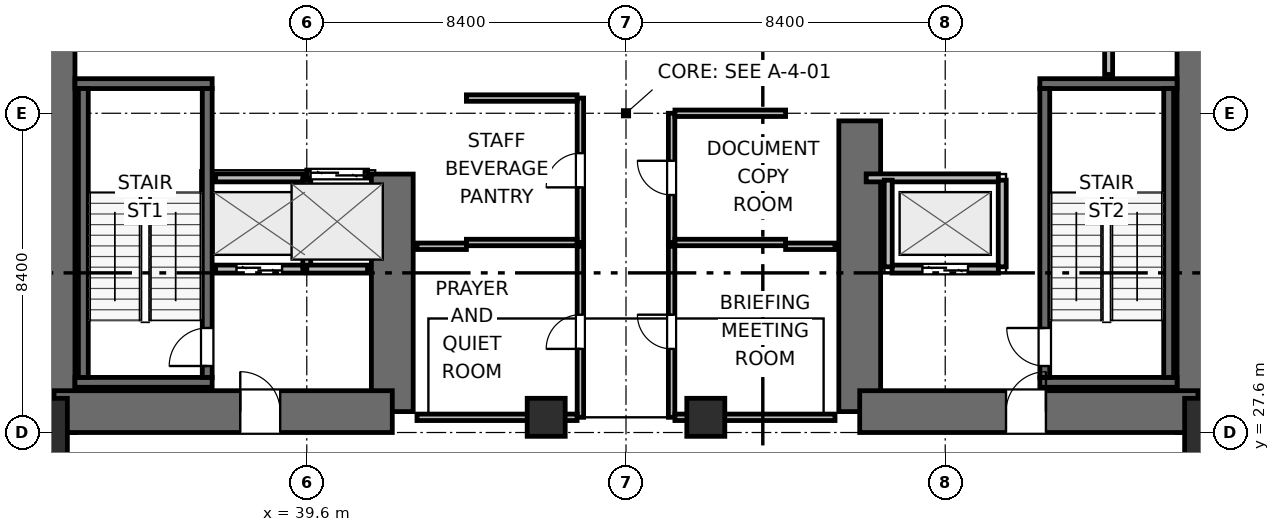
"""IFC4 building model, lengths in metres.
Left out: names, types, materials, properties, quantities, classifications, styles, units other than length and angle.
Written with IfcOpenShell. Run it as: python <this file> out.ifc"""

import sys

from ifc_helpers import new_model, si_unit, direction, frame, frame_2d, origin, origin_2d, place, context, subcontext, project, spatial, rectangle, extrude, element, fill, save


model = new_model("IFC4")
c1 = context("Model", 3, precision=1e-05, world=origin(), true_north=direction((0.0, 1.0)))
c2 = subcontext(c1, "Body", "Model", "MODEL_VIEW")
j1 = project(units=[si_unit("LENGTHUNIT", "METRE"), si_unit("PLANEANGLEUNIT", "RADIAN")], contexts=[c1])
p1 = place(None, origin())
s1 = spatial("IfcSite", under=j1, at=p1, CompositionType="ELEMENT")
p2 = place(p1, origin())
s2 = spatial("IfcBuilding", under=s1, at=p2, CompositionType="ELEMENT")
p3 = place(p2, frame((0.0, 0.0, -9.0)))
s3 = spatial("IfcBuildingStorey", under=s2, at=p3, CompositionType="ELEMENT", Elevation=-9.0)
p4 = place(p3, frame((32.95, 27.6, 0.0), z_axis=(0.0, 0.0, 1.0), x_axis=(0.0, 1.0, 0.0)))
e1 = element("IfcWall", 1, at=p4, inside=s3, PredefinedType="SHEAR", context=c2, shape_type="SweptSolid", body=[
    extrude(rectangle(XDim=16.8, YDim=1.1, at=frame_2d((8.4, 0.0))), origin(), (0.0, 0.0, 1.0), 4.5),
])
p5 = place(p3, frame((41.85, 28.15, 0.0), z_axis=(0.0, 0.0, 1.0), x_axis=(0.0, 1.0, 0.0)))
e2 = element("IfcWall", 2, at=p5, inside=s3, PredefinedType="SHEAR", context=c2, shape_type="SweptSolid", body=[
    extrude(rectangle(XDim=6.25, YDim=1.1, at=frame_2d((3.125, 0.0))), origin(), (0.0, 0.0, 1.0), 4.5),
])
p6 = place(p3, frame((32.95, 28.15, 0.0), z_axis=(0.0, 0.0, 1.0), x_axis=(1.0, 0.0, 0.0)))
e3 = element("IfcWall", 3, at=p6, inside=s3, PredefinedType="SHEAR", context=c2, shape_type="SweptSolid", body=[
    extrude(rectangle(XDim=8.9, YDim=1.1, at=frame_2d((4.45, 0.0))), origin(), (0.0, 0.0, 1.0), 4.5),
])
p7 = place(p6, frame((4.9, 0.0, 0.0)))
e4 = element("IfcOpeningElement", 4, at=p7, cuts=e3, PredefinedType="OPENING", context=c2, shape_type="SweptSolid", body=[
    extrude(rectangle(XDim=1.05, YDim=2.04, at=frame_2d((0.525, 1.02))), frame((0.0, 0.56, 0.0), z_axis=(0.0, -1.0, 0.0), x_axis=(1.0, 0.0, 0.0)), (0.0, 0.0, 1.0), 1.12),
])
p8 = place(p3, frame((54.15, 28.15, 0.0), z_axis=(0.0, 0.0, 1.0), x_axis=(0.0, 1.0, 0.0)))
e5 = element("IfcWall", 5, at=p8, inside=s3, PredefinedType="SHEAR", context=c2, shape_type="SweptSolid", body=[
    extrude(rectangle(XDim=7.65, YDim=1.1, at=frame_2d((3.825, 0.0))), origin(), (0.0, 0.0, 1.0), 4.5),
])
p9 = place(p3, frame((63.05, 27.6, 0.0), z_axis=(0.0, 0.0, 1.0), x_axis=(0.0, 1.0, 0.0)))
e6 = element("IfcWall", 6, at=p9, inside=s3, PredefinedType="SHEAR", context=c2, shape_type="SweptSolid", body=[
    extrude(rectangle(XDim=16.8, YDim=1.1, at=frame_2d((8.4, 0.0))), origin(), (0.0, 0.0, 1.0), 4.5),
])
p10 = place(p3, frame((54.15, 28.15, 0.0), z_axis=(0.0, 0.0, 1.0), x_axis=(1.0, 0.0, 0.0)))
e7 = element("IfcWall", 7, at=p10, inside=s3, PredefinedType="SHEAR", context=c2, shape_type="SweptSolid", body=[
    extrude(rectangle(XDim=8.9, YDim=1.1, at=frame_2d((4.45, 0.0))), origin(), (0.0, 0.0, 1.0), 4.5),
])
p11 = place(p10, frame((3.85, 0.0, 0.0)))
e8 = element("IfcOpeningElement", 8, at=p11, cuts=e7, PredefinedType="OPENING", context=c2, shape_type="SweptSolid", body=[
    extrude(rectangle(XDim=1.05, YDim=2.04, at=frame_2d((0.525, 1.02))), frame((0.0, 0.56, 0.0), z_axis=(0.0, -1.0, 0.0), x_axis=(1.0, 0.0, 0.0)), (0.0, 0.0, 1.0), 1.12),
])
for number, where, z_axis, x_axis in (
    (9, (33.5, 28.92, 0.0), (0.0, 0.0, 1.0), (1.0, 0.0, 0.0)),
    (10, (33.5, 36.78, 0.0), (0.0, 0.0, 1.0), (1.0, 0.0, 0.0)),
):
    element("IfcWall", number, at=place(p3, frame(where, z_axis=z_axis, x_axis=x_axis)), inside=s3, PredefinedType="SHEAR", context=c2, shape_type="SweptSolid", body=[
        extrude(rectangle(XDim=3.61, YDim=0.26, at=frame_2d((1.805, 0.0))), origin(), (0.0, 0.0, 1.0), 4.5),
    ])
p12 = place(p3, frame((33.72, 29.05, 0.0), z_axis=(0.0, 0.0, 1.0), x_axis=(0.0, 1.0, 0.0)))
e11 = element("IfcWall", 11, at=p12, inside=s3, PredefinedType="SHEAR", context=c2, shape_type="SweptSolid", body=[
    extrude(rectangle(XDim=7.6, YDim=0.26, at=frame_2d((3.8, 0.0))), origin(), (0.0, 0.0, 1.0), 4.5),
])
p13 = place(p3, frame((36.98, 29.05, 0.0), z_axis=(0.0, 0.0, 1.0), x_axis=(0.0, 1.0, 0.0)))
e12 = element("IfcWall", 12, at=p13, inside=s3, PredefinedType="SHEAR", context=c2, shape_type="SweptSolid", body=[
    extrude(rectangle(XDim=7.6, YDim=0.26, at=frame_2d((3.8, 0.0))), origin(), (0.0, 0.0, 1.0), 4.5),
])
p14 = place(p13, frame((0.3, 0.0, 0.0)))
e13 = element("IfcOpeningElement", 13, at=p14, cuts=e12, PredefinedType="OPENING", context=c2, shape_type="SweptSolid", body=[
    extrude(rectangle(XDim=1.0, YDim=2.04, at=frame_2d((0.5, 1.02))), frame((0.0, 0.14, 0.0), z_axis=(0.0, -1.0, 0.0), x_axis=(1.0, 0.0, 0.0)), (0.0, 0.0, 1.0), 0.28),
])
for number, where, z_axis, x_axis in (
    (14, (58.89, 28.92, 0.0), (0.0, 0.0, 1.0), (1.0, 0.0, 0.0)),
    (15, (58.89, 36.78, 0.0), (0.0, 0.0, 1.0), (1.0, 0.0, 0.0)),
):
    element("IfcWall", number, at=place(p3, frame(where, z_axis=z_axis, x_axis=x_axis)), inside=s3, PredefinedType="SHEAR", context=c2, shape_type="SweptSolid", body=[
        extrude(rectangle(XDim=3.61, YDim=0.26, at=frame_2d((1.805, 0.0))), origin(), (0.0, 0.0, 1.0), 4.5),
    ])
p15 = place(p3, frame((59.02, 29.05, 0.0), z_axis=(0.0, 0.0, 1.0), x_axis=(0.0, 1.0, 0.0)))
e16 = element("IfcWall", 16, at=p15, inside=s3, PredefinedType="SHEAR", context=c2, shape_type="SweptSolid", body=[
    extrude(rectangle(XDim=7.6, YDim=0.26, at=frame_2d((3.8, 0.0))), origin(), (0.0, 0.0, 1.0), 4.5),
])
p16 = place(p15, frame((0.3, 0.0, 0.0)))
e17 = element("IfcOpeningElement", 17, at=p16, cuts=e16, PredefinedType="OPENING", context=c2, shape_type="SweptSolid", body=[
    extrude(rectangle(XDim=1.0, YDim=2.04, at=frame_2d((0.5, 1.02))), frame((0.0, 0.14, 0.0), z_axis=(0.0, -1.0, 0.0), x_axis=(1.0, 0.0, 0.0)), (0.0, 0.0, 1.0), 0.28),
])
p17 = place(p3, frame((62.28, 29.05, 0.0), z_axis=(0.0, 0.0, 1.0), x_axis=(0.0, 1.0, 0.0)))
e18 = element("IfcWall", 18, at=p17, inside=s3, PredefinedType="SHEAR", context=c2, shape_type="SweptSolid", body=[
    extrude(rectangle(XDim=7.6, YDim=0.26, at=frame_2d((3.8, 0.0))), origin(), (0.0, 0.0, 1.0), 4.5),
])
for number, where, z_axis, x_axis in (
    (19, (32.4, 27.6, 0.0), (0.0, 0.0, 1.0), (1.0, 0.0, 0.0)),
    (20, (63.6, 27.6, 0.0), (0.0, 0.0, 1.0), (1.0, 0.0, 0.0)),
):
    element("IfcColumn", number, at=place(p3, frame(where, z_axis=z_axis, x_axis=x_axis)), inside=s3, PredefinedType="COLUMN", context=c2, shape_type="SweptSolid", body=[
        extrude(rectangle(XDim=1.8, YDim=1.8, at=origin_2d()), origin(), (0.0, 0.0, 1.0), 4.5),
    ])
for number, where, z_axis, x_axis in (
    (21, (45.9, 28.0, 0.0), (0.0, 0.0, 1.0), (1.0, 0.0, 0.0)),
    (22, (50.1, 28.0, 0.0), (0.0, 0.0, 1.0), (1.0, 0.0, 0.0)),
):
    element("IfcColumn", number, at=place(p3, frame(where, z_axis=z_axis, x_axis=x_axis)), inside=s3, PredefinedType="COLUMN", context=c2, shape_type="SweptSolid", body=[
        extrude(rectangle(XDim=1.0, YDim=1.0, at=origin_2d()), origin(), (0.0, 0.0, 1.0), 4.5),
    ])
p18 = place(p3, frame((60.7, 37.02, 0.0), z_axis=(0.0, 0.0, 1.0), x_axis=(0.0, 1.0, 0.0)))
e23 = element("IfcWall", 23, at=p18, inside=s3, PredefinedType="PARTITIONING", context=c2, shape_type="SweptSolid", body=[
    extrude(rectangle(XDim=1.96, YDim=0.21, at=frame_2d((0.98, 0.0))), origin(), (0.0, 0.0, 1.0), 4.18),
])
p19 = place(p3, frame((37.2, 31.9, 0.0), z_axis=(0.0, 0.0, 1.0), x_axis=(1.0, 0.0, 0.0)))
e24 = element("IfcWall", 24, at=p19, inside=s3, PredefinedType="PARTITIONING", context=c2, shape_type="SweptSolid", body=[
    extrude(rectangle(XDim=2.3, YDim=0.21, at=frame_2d((1.15, 0.0))), origin(), (0.0, 0.0, 1.0), 4.18),
])
p20 = place(p19, frame((0.55, 0.0, 0.0)))
e25 = element("IfcOpeningElement", 25, at=p20, cuts=e24, PredefinedType="OPENING", context=c2, shape_type="SweptSolid", body=[
    extrude(rectangle(XDim=1.2, YDim=2.04, at=frame_2d((0.6, 1.02))), frame((0.0, 0.115, 0.0), z_axis=(0.0, -1.0, 0.0), x_axis=(1.0, 0.0, 0.0)), (0.0, 0.0, 1.0), 0.23),
])
p21 = place(p3, frame((37.2, 34.3, 0.0), z_axis=(0.0, 0.0, 1.0), x_axis=(1.0, 0.0, 0.0)))
e26 = element("IfcWall", 26, at=p21, inside=s3, PredefinedType="PARTITIONING", context=c2, shape_type="SweptSolid", body=[
    extrude(rectangle(XDim=2.3, YDim=0.21, at=frame_2d((1.15, 0.0))), origin(), (0.0, 0.0, 1.0), 4.18),
])
p22 = place(p3, frame((39.6, 31.96, 0.0), z_axis=(0.0, 0.0, 1.0), x_axis=(0.0, 1.0, 0.0)))
e27 = element("IfcWall", 27, at=p22, inside=s3, PredefinedType="PARTITIONING", context=c2, shape_type="SweptSolid", body=[
    extrude(rectangle(XDim=2.28, YDim=0.21, at=frame_2d((1.14, 0.0))), origin(), (0.0, 0.0, 1.0), 4.18),
])
p23 = place(p3, frame((55.0, 31.9, 0.0), z_axis=(0.0, 0.0, 1.0), x_axis=(1.0, 0.0, 0.0)))
e28 = element("IfcWall", 28, at=p23, inside=s3, PredefinedType="PARTITIONING", context=c2, shape_type="SweptSolid", body=[
    extrude(rectangle(XDim=2.8, YDim=0.21, at=frame_2d((1.4, 0.0))), origin(), (0.0, 0.0, 1.0), 4.18),
])
p24 = place(p23, frame((0.8, 0.0, 0.0)))
e29 = element("IfcOpeningElement", 29, at=p24, cuts=e28, PredefinedType="OPENING", context=c2, shape_type="SweptSolid", body=[
    extrude(rectangle(XDim=1.2, YDim=2.04, at=frame_2d((0.6, 1.02))), frame((0.0, 0.115, 0.0), z_axis=(0.0, -1.0, 0.0), x_axis=(1.0, 0.0, 0.0)), (0.0, 0.0, 1.0), 0.23),
])
p25 = place(p3, frame((54.32, 34.3, 0.0), z_axis=(0.0, 0.0, 1.0), x_axis=(1.0, 0.0, 0.0)))
e30 = element("IfcWall", 30, at=p25, inside=s3, PredefinedType="PARTITIONING", context=c2, shape_type="SweptSolid", body=[
    extrude(rectangle(XDim=3.48, YDim=0.21, at=frame_2d((1.74, 0.0))), origin(), (0.0, 0.0, 1.0), 4.18),
])
for number, where, z_axis, x_axis in (
    (31, (54.9, 31.96, 0.0), (0.0, 0.0, 1.0), (0.0, 1.0, 0.0)),
    (32, (57.9, 31.96, 0.0), (0.0, 0.0, 1.0), (0.0, 1.0, 0.0)),
):
    element("IfcWall", number, at=place(p3, frame(where, z_axis=z_axis, x_axis=x_axis)), inside=s3, PredefinedType="PARTITIONING", context=c2, shape_type="SweptSolid", body=[
        extrude(rectangle(XDim=2.28, YDim=0.21, at=frame_2d((1.14, 0.0))), origin(), (0.0, 0.0, 1.0), 4.18),
    ])
p26 = place(p3, frame((39.6, 34.4, 0.0), z_axis=(0.0, 0.0, 1.0), x_axis=(1.0, 0.0, 0.0)))
e33 = element("IfcWall", 33, at=p26, inside=s3, PredefinedType="PARTITIONING", context=c2, shape_type="SweptSolid", body=[
    extrude(rectangle(XDim=1.6, YDim=0.21, at=frame_2d((0.8, 0.0))), origin(), (0.0, 0.0, 1.0), 4.18),
])
p27 = place(p26, frame((0.1, 0.0, 0.0)))
e34 = element("IfcOpeningElement", 34, at=p27, cuts=e33, PredefinedType="OPENING", context=c2, shape_type="SweptSolid", body=[
    extrude(rectangle(XDim=1.4, YDim=2.06, at=frame_2d((0.7, 1.03))), frame((0.0, 0.115, 0.0), z_axis=(0.0, -1.0, 0.0), x_axis=(1.0, 0.0, 0.0)), (0.0, 0.0, 1.0), 0.23),
])
p28 = place(p3, frame((39.6, 31.9, 0.0), z_axis=(0.0, 0.0, 1.0), x_axis=(1.0, 0.0, 0.0)))
e35 = element("IfcWall", 35, at=p28, inside=s3, PredefinedType="PARTITIONING", context=c2, shape_type="SweptSolid", body=[
    extrude(rectangle(XDim=1.6, YDim=0.21, at=frame_2d((0.8, 0.0))), origin(), (0.0, 0.0, 1.0), 4.18),
])
p29 = place(p3, frame((46.8, 32.6, 0.0), z_axis=(0.0, 0.0, 1.0), x_axis=(0.0, 1.0, 0.0)))
e36 = element("IfcWall", 36, at=p29, inside=s3, PredefinedType="PARTITIONING", context=c2, shape_type="SweptSolid", body=[
    extrude(rectangle(XDim=3.8, YDim=0.17, at=frame_2d((1.9, 0.0))), origin(), (0.0, 0.0, 1.0), 4.18),
])
p30 = place(p29, frame((1.45, 0.0, 0.0)))
e37 = element("IfcOpeningElement", 37, at=p30, cuts=e36, PredefinedType="OPENING", context=c2, shape_type="SweptSolid", body=[
    extrude(rectangle(XDim=0.9, YDim=2.02, at=frame_2d((0.45, 1.01))), frame((0.0, 0.095, 0.0), z_axis=(0.0, -1.0, 0.0), x_axis=(1.0, 0.0, 0.0)), (0.0, 0.0, 1.0), 0.19),
])
for number, where, z_axis, x_axis in (
    (38, (43.8, 32.6, 0.0), (0.0, 0.0, 1.0), (1.0, 0.0, 0.0)),
    (39, (43.8, 36.4, 0.0), (0.0, 0.0, 1.0), (1.0, 0.0, 0.0)),
):
    element("IfcWall", number, at=place(p3, frame(where, z_axis=z_axis, x_axis=x_axis)), inside=s3, PredefinedType="PARTITIONING", context=c2, shape_type="SweptSolid", body=[
        extrude(rectangle(XDim=2.913, YDim=0.17, at=frame_2d((1.457, 0.0))), origin(), (0.0, 0.0, 1.0), 4.18),
    ])
p31 = place(p3, frame((49.2, 32.6, 0.0), z_axis=(0.0, 0.0, 1.0), x_axis=(0.0, 1.0, 0.0)))
e40 = element("IfcWall", 40, at=p31, inside=s3, PredefinedType="PARTITIONING", context=c2, shape_type="SweptSolid", body=[
    extrude(rectangle(XDim=3.4, YDim=0.17, at=frame_2d((1.7, 0.0))), origin(), (0.0, 0.0, 1.0), 4.18),
])
p32 = place(p31, frame((1.25, 0.0, 0.0)))
e41 = element("IfcOpeningElement", 41, at=p32, cuts=e40, PredefinedType="OPENING", context=c2, shape_type="SweptSolid", body=[
    extrude(rectangle(XDim=0.9, YDim=2.02, at=frame_2d((0.45, 1.01))), frame((0.0, 0.095, 0.0), z_axis=(0.0, -1.0, 0.0), x_axis=(1.0, 0.0, 0.0)), (0.0, 0.0, 1.0), 0.19),
])
for number, where, z_axis, x_axis in (
    (42, (49.287, 32.6, 0.0), (0.0, 0.0, 1.0), (1.0, 0.0, 0.0)),
    (43, (49.287, 36.0, 0.0), (0.0, 0.0, 1.0), (1.0, 0.0, 0.0)),
):
    element("IfcWall", number, at=place(p3, frame(where, z_axis=z_axis, x_axis=x_axis)), inside=s3, PredefinedType="PARTITIONING", context=c2, shape_type="SweptSolid", body=[
        extrude(rectangle(XDim=2.913, YDim=0.17, at=frame_2d((1.457, 0.0))), origin(), (0.0, 0.0, 1.0), 4.18),
    ])
p33 = place(p3, frame((46.8, 28.0, 0.0), z_axis=(0.0, 0.0, 1.0), x_axis=(0.0, 1.0, 0.0)))
e44 = element("IfcWall", 44, at=p33, inside=s3, PredefinedType="PARTITIONING", context=c2, shape_type="SweptSolid", body=[
    extrude(rectangle(XDim=4.5, YDim=0.17, at=frame_2d((2.25, 0.0))), origin(), (0.0, 0.0, 1.0), 4.18),
])
p34 = place(p33, frame((1.8, 0.0, 0.0)))
e45 = element("IfcOpeningElement", 45, at=p34, cuts=e44, PredefinedType="OPENING", context=c2, shape_type="SweptSolid", body=[
    extrude(rectangle(XDim=0.9, YDim=2.02, at=frame_2d((0.45, 1.01))), frame((0.0, 0.095, 0.0), z_axis=(0.0, -1.0, 0.0), x_axis=(1.0, 0.0, 0.0)), (0.0, 0.0, 1.0), 0.19),
])
p35 = place(p3, frame((42.5, 28.0, 0.0), z_axis=(0.0, 0.0, 1.0), x_axis=(1.0, 0.0, 0.0)))
e46 = element("IfcWall", 46, at=p35, inside=s3, PredefinedType="PARTITIONING", context=c2, shape_type="SweptSolid", body=[
    extrude(rectangle(XDim=4.213, YDim=0.17, at=frame_2d((2.106, 0.0))), origin(), (0.0, 0.0, 1.0), 3.065),
])
p36 = place(p3, frame((42.5, 32.5, 0.0), z_axis=(0.0, 0.0, 1.0), x_axis=(1.0, 0.0, 0.0)))
e47 = element("IfcWall", 47, at=p36, inside=s3, PredefinedType="PARTITIONING", context=c2, shape_type="SweptSolid", body=[
    extrude(rectangle(XDim=1.3, YDim=0.17, at=frame_2d((0.65, 0.0))), origin(), (0.0, 0.0, 1.0), 4.18),
])
p37 = place(p3, frame((49.2, 28.0, 0.0), z_axis=(0.0, 0.0, 1.0), x_axis=(0.0, 1.0, 0.0)))
e48 = element("IfcWall", 48, at=p37, inside=s3, PredefinedType="PARTITIONING", context=c2, shape_type="SweptSolid", body=[
    extrude(rectangle(XDim=4.5, YDim=0.17, at=frame_2d((2.25, 0.0))), origin(), (0.0, 0.0, 1.0), 4.18),
])
p38 = place(p37, frame((1.8, 0.0, 0.0)))
e49 = element("IfcOpeningElement", 49, at=p38, cuts=e48, PredefinedType="OPENING", context=c2, shape_type="SweptSolid", body=[
    extrude(rectangle(XDim=0.9, YDim=2.02, at=frame_2d((0.45, 1.01))), frame((0.0, 0.095, 0.0), z_axis=(0.0, -1.0, 0.0), x_axis=(1.0, 0.0, 0.0)), (0.0, 0.0, 1.0), 0.19),
])
p39 = place(p3, frame((49.287, 28.0, 0.0), z_axis=(0.0, 0.0, 1.0), x_axis=(1.0, 0.0, 0.0)))
e50 = element("IfcWall", 50, at=p39, inside=s3, PredefinedType="PARTITIONING", context=c2, shape_type="SweptSolid", body=[
    extrude(rectangle(XDim=4.213, YDim=0.17, at=frame_2d((2.106, 0.0))), origin(), (0.0, 0.0, 1.0), 3.065),
])
p40 = place(p3, frame((52.2, 32.5, 0.0), z_axis=(0.0, 0.0, 1.0), x_axis=(1.0, 0.0, 0.0)))
e51 = element("IfcWall", 51, at=p40, inside=s3, PredefinedType="PARTITIONING", context=c2, shape_type="SweptSolid", body=[
    extrude(rectangle(XDim=1.3, YDim=0.17, at=frame_2d((0.65, 0.0))), origin(), (0.0, 0.0, 1.0), 4.18),
])
p41 = place(p14, origin())
e52 = element("IfcDoor", 52, at=p41, inside=s3, OperationType="SINGLE_SWING_LEFT", PredefinedType="DOOR", context=c2, shape_type="SweptSolid", body=[
    extrude(rectangle(XDim=1.0, YDim=2.04, at=frame_2d((0.5, 1.02))), frame((0.0, 0.025, 0.0), z_axis=(0.0, -1.0, 0.0), x_axis=(1.0, 0.0, 0.0)), (0.0, 0.0, 1.0), 0.05),
])
fill(e13, e52)
p42 = place(p16, origin())
e53 = element("IfcDoor", 53, at=p42, inside=s3, OperationType="SINGLE_SWING_RIGHT", PredefinedType="DOOR", context=c2, shape_type="SweptSolid", body=[
    extrude(rectangle(XDim=1.0, YDim=2.04, at=frame_2d((0.5, 1.02))), frame((0.0, 0.025, 0.0), z_axis=(0.0, -1.0, 0.0), x_axis=(1.0, 0.0, 0.0)), (0.0, 0.0, 1.0), 0.05),
])
fill(e17, e53)
p43 = place(p20, origin())
e54 = element("IfcDoor", 54, at=p43, inside=s3, OperationType="DOUBLE_DOOR_SLIDING", PredefinedType="DOOR", context=c2, shape_type="SweptSolid", body=[
    extrude(rectangle(XDim=1.2, YDim=2.04, at=frame_2d((0.6, 1.02))), frame((0.0, 0.025, 0.0), z_axis=(0.0, -1.0, 0.0), x_axis=(1.0, 0.0, 0.0)), (0.0, 0.0, 1.0), 0.05),
])
fill(e25, e54)
p44 = place(p24, origin())
e55 = element("IfcDoor", 55, at=p44, inside=s3, OperationType="DOUBLE_DOOR_SLIDING", PredefinedType="DOOR", context=c2, shape_type="SweptSolid", body=[
    extrude(rectangle(XDim=1.2, YDim=2.04, at=frame_2d((0.6, 1.02))), frame((0.0, 0.025, 0.0), z_axis=(0.0, -1.0, 0.0), x_axis=(1.0, 0.0, 0.0)), (0.0, 0.0, 1.0), 0.05),
])
fill(e29, e55)
p45 = place(p27, origin())
e56 = element("IfcDoor", 56, at=p45, inside=s3, OperationType="DOUBLE_DOOR_SLIDING", PredefinedType="DOOR", context=c2, shape_type="SweptSolid", body=[
    extrude(rectangle(XDim=1.4, YDim=2.06, at=frame_2d((0.7, 1.03))), frame((0.0, 0.025, 0.0), z_axis=(0.0, -1.0, 0.0), x_axis=(1.0, 0.0, 0.0)), (0.0, 0.0, 1.0), 0.05),
])
fill(e34, e56)
p46 = place(p7, origin())
e57 = element("IfcDoor", 57, at=p46, inside=s3, OperationType="SINGLE_SWING_LEFT", PredefinedType="DOOR", context=c2, shape_type="SweptSolid", body=[
    extrude(rectangle(XDim=1.05, YDim=2.04, at=frame_2d((0.525, 1.02))), frame((0.0, 0.025, 0.0), z_axis=(0.0, -1.0, 0.0), x_axis=(1.0, 0.0, 0.0)), (0.0, 0.0, 1.0), 0.05),
])
fill(e4, e57)
p47 = place(p11, origin())
e58 = element("IfcDoor", 58, at=p47, inside=s3, OperationType="SINGLE_SWING_RIGHT", PredefinedType="DOOR", context=c2, shape_type="SweptSolid", body=[
    extrude(rectangle(XDim=1.05, YDim=2.04, at=frame_2d((0.525, 1.02))), frame((0.0, 0.025, 0.0), z_axis=(0.0, -1.0, 0.0), x_axis=(1.0, 0.0, 0.0)), (0.0, 0.0, 1.0), 0.05),
])
fill(e8, e58)
p48 = place(p30, origin())
e59 = element("IfcDoor", 59, at=p48, inside=s3, OperationType="SINGLE_SWING_LEFT", PredefinedType="DOOR", context=c2, shape_type="SweptSolid", body=[
    extrude(rectangle(XDim=0.9, YDim=2.02, at=frame_2d((0.45, 1.01))), frame((0.0, 0.025, 0.0), z_axis=(0.0, -1.0, 0.0), x_axis=(1.0, 0.0, 0.0)), (0.0, 0.0, 1.0), 0.05),
])
fill(e37, e59)
p49 = place(p32, origin())
e60 = element("IfcDoor", 60, at=p49, inside=s3, OperationType="SINGLE_SWING_RIGHT", PredefinedType="DOOR", context=c2, shape_type="SweptSolid", body=[
    extrude(rectangle(XDim=0.9, YDim=2.02, at=frame_2d((0.45, 1.01))), frame((0.0, 0.025, 0.0), z_axis=(0.0, -1.0, 0.0), x_axis=(1.0, 0.0, 0.0)), (0.0, 0.0, 1.0), 0.05),
])
fill(e41, e60)
p50 = place(p34, origin())
e61 = element("IfcDoor", 61, at=p50, inside=s3, OperationType="SINGLE_SWING_LEFT", PredefinedType="DOOR", context=c2, shape_type="SweptSolid", body=[
    extrude(rectangle(XDim=0.9, YDim=2.02, at=frame_2d((0.45, 1.01))), frame((0.0, 0.025, 0.0), z_axis=(0.0, -1.0, 0.0), x_axis=(1.0, 0.0, 0.0)), (0.0, 0.0, 1.0), 0.05),
])
fill(e45, e61)
p51 = place(p38, origin())
e62 = element("IfcDoor", 62, at=p51, inside=s3, OperationType="SINGLE_SWING_RIGHT", PredefinedType="DOOR", context=c2, shape_type="SweptSolid", body=[
    extrude(rectangle(XDim=0.9, YDim=2.02, at=frame_2d((0.45, 1.01))), frame((0.0, 0.025, 0.0), z_axis=(0.0, -1.0, 0.0), x_axis=(1.0, 0.0, 0.0)), (0.0, 0.0, 1.0), 0.05),
])
fill(e49, e62)
save(model, sys.argv[1])
